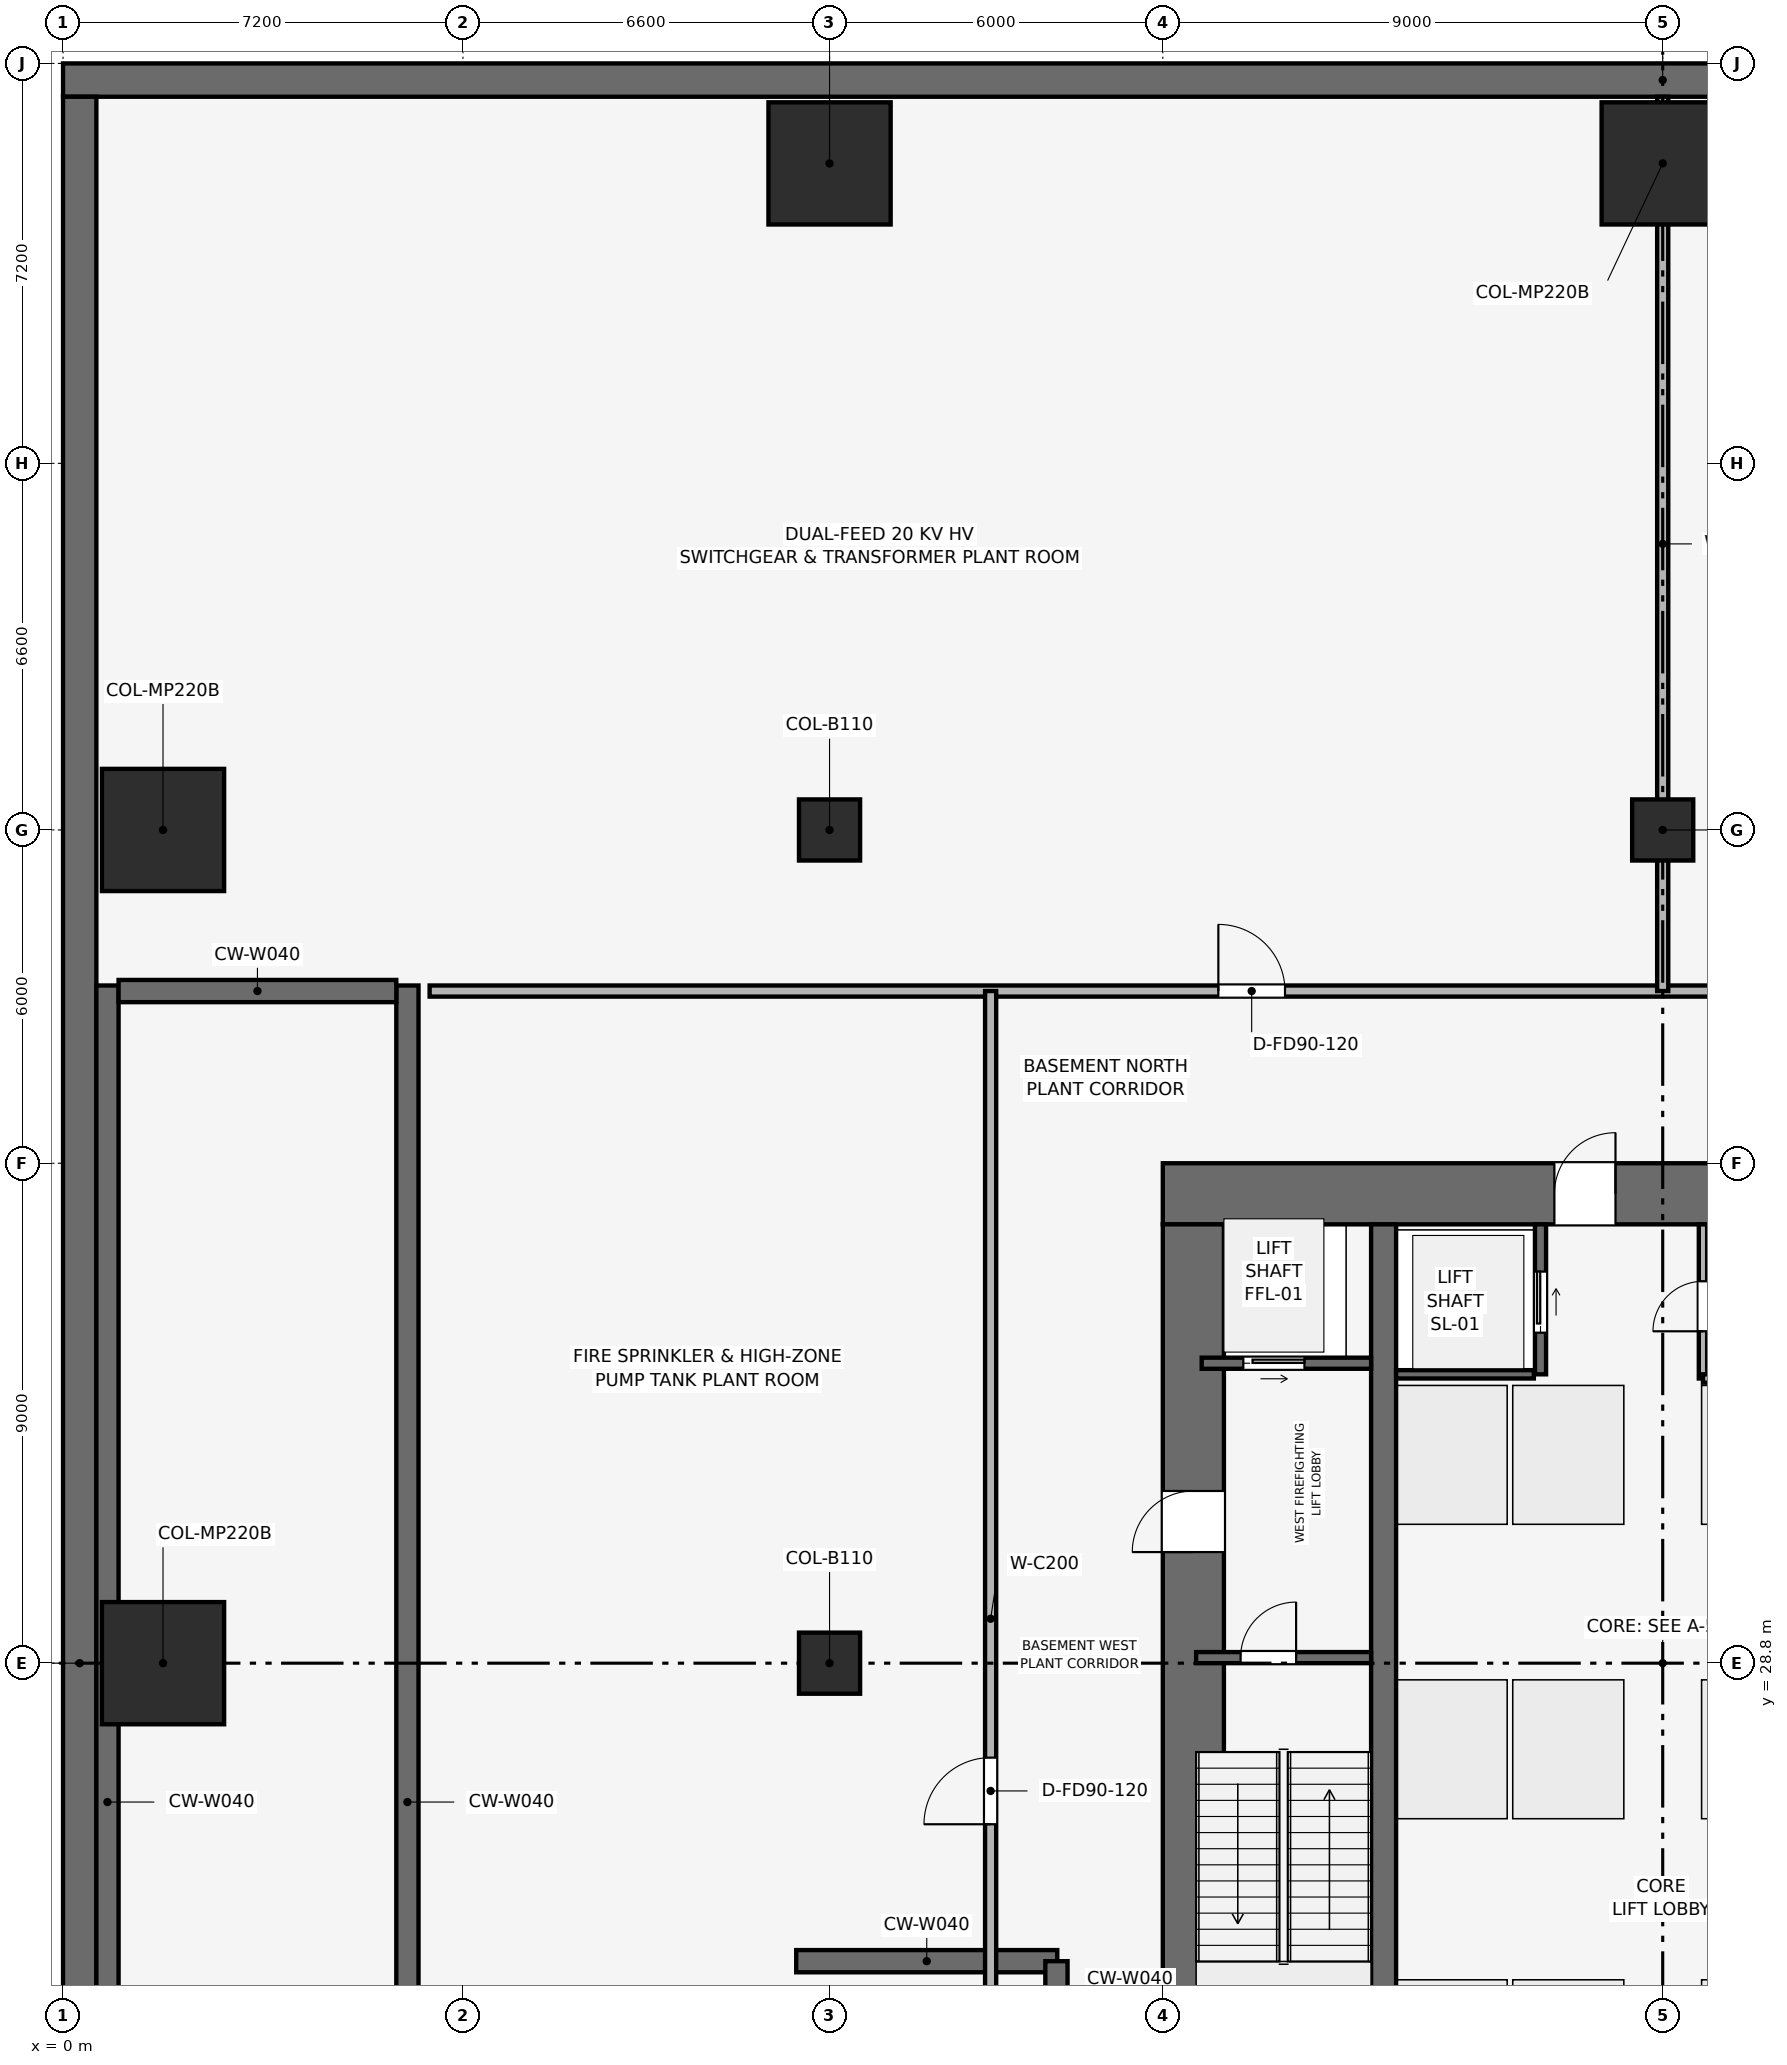
"""IFC4 building model, lengths in metres.
Left out: names, types, materials, properties, quantities, classifications, styles, units other than length and angle.
Written with IfcOpenShell. Run it as: python <this file> out.ifc"""

import sys

from ifc_helpers import new_model, si_unit, direction, frame, frame_2d, origin, origin_2d, place, context, subcontext, project, spatial, rectangle, extrude, element, fill, save


model = new_model("IFC4")
c1 = context("Model", 3, precision=1e-05, world=origin(), true_north=direction((0.0, 1.0)))
c2 = subcontext(c1, "Body", "Model", "MODEL_VIEW")
j1 = project(units=[si_unit("LENGTHUNIT", "METRE"), si_unit("PLANEANGLEUNIT", "RADIAN")], contexts=[c1])
p1 = place(None, origin())
s1 = spatial("IfcSite", under=j1, at=p1, CompositionType="ELEMENT")
p2 = place(p1, origin())
s2 = spatial("IfcBuilding", under=s1, at=p2, CompositionType="ELEMENT")
p3 = place(p2, frame((0.0, 0.0, -9.6)))
s3 = spatial("IfcBuildingStorey", under=s2, at=p3, CompositionType="ELEMENT", Elevation=-9.6)
p4 = place(p3, frame((0.0, 57.3, 0.0), z_axis=(0.0, 0.0, 1.0), x_axis=(1.0, 0.0, 0.0)))
e1 = element("IfcWall", 1, at=p4, inside=s3, PredefinedType="SOLIDWALL", context=c2, shape_type="SweptSolid", body=[
    extrude(rectangle(XDim=57.6, YDim=0.6, at=frame_2d((28.8, 0.0))), origin(), (0.0, 0.0, 1.0), 4.8),
])
p5 = place(p3, frame((0.3, 0.6, 0.0), z_axis=(0.0, 0.0, 1.0), x_axis=(0.0, 1.0, 0.0)))
e2 = element("IfcWall", 2, at=p5, inside=s3, PredefinedType="SOLIDWALL", context=c2, shape_type="SweptSolid", body=[
    extrude(rectangle(XDim=56.4, YDim=0.6, at=frame_2d((28.2, 0.0))), origin(), (0.0, 0.0, 1.0), 4.8),
])
p6 = place(p3, frame((19.8, 37.25, 0.0), z_axis=(0.0, 0.0, 1.0), x_axis=(1.0, 0.0, 0.0)))
e3 = element("IfcWall", 3, at=p6, inside=s3, PredefinedType="SHEAR", context=c2, shape_type="SweptSolid", body=[
    extrude(rectangle(XDim=18.0, YDim=1.1, at=frame_2d((9.0, 0.0))), origin(), (0.0, 0.0, 1.0), 4.8),
])
p7 = place(p6, frame((7.05, 0.0, 0.0)))
e4 = element("IfcOpeningElement", 4, at=p7, cuts=e3, PredefinedType="OPENING", context=c2, shape_type="SweptSolid", body=[
    extrude(rectangle(XDim=1.1, YDim=2.15, at=frame_2d((0.55, 1.075))), frame((0.0, 0.56, 0.0), z_axis=(0.0, -1.0, 0.0), x_axis=(1.0, 0.0, 0.0)), (0.0, 0.0, 1.0), 1.12),
])
p8 = place(p3, frame((20.35, 20.9, 0.0), z_axis=(0.0, 0.0, 1.0), x_axis=(0.0, 1.0, 0.0)))
e5 = element("IfcWall", 5, at=p8, inside=s3, PredefinedType="SHEAR", context=c2, shape_type="SweptSolid", body=[
    extrude(rectangle(XDim=15.8, YDim=1.1, at=frame_2d((7.9, 0.0))), origin(), (0.0, 0.0, 1.0), 4.8),
])
p9 = place(p8, frame((9.9, 0.0, 0.0)))
e6 = element("IfcOpeningElement", 6, at=p9, cuts=e5, PredefinedType="OPENING", context=c2, shape_type="SweptSolid", body=[
    extrude(rectangle(XDim=1.1, YDim=2.15, at=frame_2d((0.55, 1.075))), frame((0.0, 0.56, 0.0), z_axis=(0.0, -1.0, 0.0), x_axis=(1.0, 0.0, 0.0)), (0.0, 0.0, 1.0), 1.12),
])
p10 = place(p3, frame((23.775, 20.9, 0.0), z_axis=(0.0, 0.0, 1.0), x_axis=(0.0, 1.0, 0.0)))
e7 = element("IfcWall", 7, at=p10, inside=s3, PredefinedType="SHEAR", context=c2, shape_type="SweptSolid", body=[
    extrude(rectangle(XDim=15.8, YDim=0.45, at=frame_2d((7.9, 0.0))), origin(), (0.0, 0.0, 1.0), 4.8),
])
for number, where, z_axis, x_axis in (
    (8, (28.8, 55.8, 0.0), (0.0, 0.0, 1.0), (1.0, 0.0, 0.0)),
    (9, (13.8, 55.8, 0.0), (0.0, 0.0, 1.0), (1.0, 0.0, 0.0)),
    (10, (1.8, 43.8, 0.0), (0.0, 0.0, 1.0), (1.0, 0.0, 0.0)),
    (11, (1.8, 28.8, 0.0), (0.0, 0.0, 1.0), (1.0, 0.0, 0.0)),
):
    element("IfcColumn", number, at=place(p3, frame(where, z_axis=z_axis, x_axis=x_axis)), inside=s3, PredefinedType="COLUMN", context=c2, shape_type="SweptSolid", body=[
        extrude(rectangle(XDim=2.2, YDim=2.2, at=origin_2d()), origin(), (0.0, 0.0, 1.0), 4.798),
    ])
for number, where, z_axis, x_axis in (
    (12, (13.8, 43.8, 0.0), (0.0, 0.0, 1.0), (1.0, 0.0, 0.0)),
    (13, (28.8, 43.8, 0.0), (0.0, 0.0, 1.0), (1.0, 0.0, 0.0)),
    (14, (13.8, 28.8, 0.0), (0.0, 0.0, 1.0), (1.0, 0.0, 0.0)),
):
    element("IfcColumn", number, at=place(p3, frame(where, z_axis=z_axis, x_axis=x_axis)), inside=s3, PredefinedType="COLUMN", context=c2, shape_type="SweptSolid", body=[
        extrude(rectangle(XDim=1.1, YDim=1.1, at=origin_2d()), origin(), (0.0, 0.0, 1.0), 4.798),
    ])
for number, where, z_axis, x_axis in (
    (15, (0.8, 11.6, 0.0), (0.0, 0.0, 1.0), (0.0, 1.0, 0.0)),
    (16, (6.2, 11.6, 0.0), (0.0, 0.0, 1.0), (0.0, 1.0, 0.0)),
):
    element("IfcWall", number, at=place(p3, frame(where, z_axis=z_axis, x_axis=x_axis)), inside=s3, PredefinedType="SHEAR", context=c2, shape_type="SweptSolid", body=[
        extrude(rectangle(XDim=29.4, YDim=0.4, at=frame_2d((14.7, 0.0))), origin(), (0.0, 0.0, 1.0), 4.45),
    ])
p11 = place(p3, frame((1.0, 40.9, 0.0), z_axis=(0.0, 0.0, 1.0), x_axis=(1.0, 0.0, 0.0)))
e17 = element("IfcWall", 17, at=p11, inside=s3, PredefinedType="SHEAR", context=c2, shape_type="SweptSolid", body=[
    extrude(rectangle(XDim=5.0, YDim=0.4, at=frame_2d((2.5, 0.0))), origin(), (0.0, 0.0, 1.0), 4.45),
])
p12 = place(p3, frame((13.2, 23.435, 0.0), z_axis=(0.0, 0.0, 1.0), x_axis=(1.0, 0.0, 0.0)))
e18 = element("IfcWall", 18, at=p12, inside=s3, PredefinedType="SHEAR", context=c2, shape_type="SweptSolid", body=[
    extrude(rectangle(XDim=4.7, YDim=0.4, at=frame_2d((2.35, 0.0))), origin(), (0.0, 0.0, 1.0), 4.448),
])
p13 = place(p3, frame((17.885, 20.115, 0.0), z_axis=(0.0, 0.0, 1.0), x_axis=(0.0, 1.0, 0.0)))
e19 = element("IfcWall", 19, at=p13, inside=s3, PredefinedType="SHEAR", context=c2, shape_type="SweptSolid", body=[
    extrude(rectangle(XDim=3.32, YDim=0.4, at=frame_2d((1.66, 0.0))), origin(), (0.0, 0.0, 1.0), 4.448),
])
p14 = place(p3, frame((20.4, 28.9, 0.0), z_axis=(0.0, 0.0, 1.0), x_axis=(1.0, 0.0, 0.0)))
e20 = element("IfcWall", 20, at=p14, inside=s3, PredefinedType="SHEAR", context=c2, shape_type="SweptSolid", body=[
    extrude(rectangle(XDim=3.15, YDim=0.2, at=frame_2d((1.575, 0.0))), origin(), (0.0, 0.0, 1.0), 4.45),
])
p15 = place(p14, frame((0.8, 0.0, 0.0)))
e21 = element("IfcOpeningElement", 21, at=p15, cuts=e20, PredefinedType="OPENING", context=c2, shape_type="SweptSolid", body=[
    extrude(rectangle(XDim=1.0, YDim=2.1, at=frame_2d((0.5, 1.05))), frame((0.0, 0.11, 0.0), z_axis=(0.0, -1.0, 0.0), x_axis=(1.0, 0.0, 0.0)), (0.0, 0.0, 1.0), 0.22),
])
p16 = place(p3, frame((20.5, 34.2, 0.0), z_axis=(0.0, 0.0, 1.0), x_axis=(1.0, 0.0, 0.0)))
e22 = element("IfcWall", 22, at=p16, inside=s3, PredefinedType="SHEAR", context=c2, shape_type="SweptSolid", body=[
    extrude(rectangle(XDim=3.05, YDim=0.2, at=frame_2d((1.525, 0.0))), origin(), (0.0, 0.0, 1.0), 4.45),
])
p17 = place(p16, frame((0.75, 0.0, 0.0)))
e23 = element("IfcOpeningElement", 23, at=p17, cuts=e22, PredefinedType="OPENING", context=c2, shape_type="SweptSolid", body=[
    extrude(rectangle(XDim=1.1, YDim=2.15, at=frame_2d((0.55, 1.075))), frame((0.0, 0.11, 0.0), z_axis=(0.0, -1.0, 0.0), x_axis=(1.0, 0.0, 0.0)), (0.0, 0.0, 1.0), 0.22),
])
p18 = place(p3, frame((26.6, 34.0, 0.0), z_axis=(0.0, 0.0, 1.0), x_axis=(0.0, 1.0, 0.0)))
e24 = element("IfcWall", 24, at=p18, inside=s3, PredefinedType="SHEAR", context=c2, shape_type="SweptSolid", body=[
    extrude(rectangle(XDim=2.7, YDim=0.2, at=frame_2d((1.35, 0.0))), origin(), (0.0, 0.0, 1.0), 4.45),
])
p19 = place(p18, frame((0.75, 0.0, 0.0)))
e25 = element("IfcOpeningElement", 25, at=p19, cuts=e24, PredefinedType="OPENING", context=c2, shape_type="SweptSolid", body=[
    extrude(rectangle(XDim=1.1, YDim=2.15, at=frame_2d((0.55, 1.075))), frame((0.0, 0.11, 0.0), z_axis=(0.0, -1.0, 0.0), x_axis=(1.0, 0.0, 0.0)), (0.0, 0.0, 1.0), 0.22),
])
p20 = place(p3, frame((24.0, 34.0, 0.0), z_axis=(0.0, 0.0, 1.0), x_axis=(1.0, 0.0, 0.0)))
e26 = element("IfcWall", 26, at=p20, inside=s3, PredefinedType="SHEAR", context=c2, shape_type="SweptSolid", body=[
    extrude(rectangle(XDim=2.48, YDim=0.15, at=frame_2d((1.24, 0.0))), origin(), (0.0, 0.0, 1.0), 4.45),
])
p21 = place(p3, frame((29.525, 33.925, 0.0), z_axis=(0.0, 0.0, 1.0), x_axis=(0.0, 1.0, 0.0)))
e27 = element("IfcWall", 27, at=p21, inside=s3, PredefinedType="PARTITIONING", context=c2, shape_type="SweptSolid", body=[
    extrude(rectangle(XDim=2.775, YDim=0.15, at=frame_2d((1.387, 0.0))), origin(), (0.0, 0.0, 1.0), 4.45),
])
p22 = place(p21, frame((0.85, 0.0, 0.0)))
e28 = element("IfcOpeningElement", 28, at=p22, cuts=e27, PredefinedType="OPENING", context=c2, shape_type="SweptSolid", body=[
    extrude(rectangle(XDim=0.9, YDim=2.1, at=frame_2d((0.45, 1.05))), frame((0.0, 0.085, 0.0), z_axis=(0.0, -1.0, 0.0), x_axis=(1.0, 0.0, 0.0)), (0.0, 0.0, 1.0), 0.17),
])
p23 = place(p3, frame((29.525, 33.925, 0.0), z_axis=(0.0, 0.0, 1.0), x_axis=(1.0, 0.0, 0.0)))
e29 = element("IfcWall", 29, at=p23, inside=s3, PredefinedType="PARTITIONING", context=c2, shape_type="SweptSolid", body=[
    extrude(rectangle(XDim=2.625, YDim=0.15, at=frame_2d((1.312, 0.0))), origin(), (0.0, 0.0, 1.0), 4.45),
])
p24 = place(p3, frame((6.6, 40.9, 0.0), z_axis=(0.0, 0.0, 1.0), x_axis=(1.0, 0.0, 0.0)))
e30 = element("IfcWall", 30, at=p24, inside=s3, PredefinedType="PARTITIONING", context=c2, shape_type="SweptSolid", body=[
    extrude(rectangle(XDim=50.4, YDim=0.2, at=frame_2d((25.2, 0.0))), origin(), (0.0, 0.0, 1.0), 3.035),
])
p25 = place(p24, frame((14.2, 0.0, 0.0)))
e31 = element("IfcOpeningElement", 31, at=p25, cuts=e30, PredefinedType="OPENING", context=c2, shape_type="SweptSolid", body=[
    extrude(rectangle(XDim=1.2, YDim=2.2, at=frame_2d((0.6, 1.1))), frame((0.0, 0.11, 0.0), z_axis=(0.0, -1.0, 0.0), x_axis=(1.0, 0.0, 0.0)), (0.0, 0.0, 1.0), 0.22),
])
p26 = place(p24, frame((28.2, 0.0, 0.0)))
e32 = element("IfcOpeningElement", 32, at=p26, cuts=e30, PredefinedType="OPENING", context=c2, shape_type="SweptSolid", body=[
    extrude(rectangle(XDim=1.2, YDim=2.2, at=frame_2d((0.6, 1.1))), frame((0.0, 0.11, 0.0), z_axis=(0.0, -1.0, 0.0), x_axis=(1.0, 0.0, 0.0)), (0.0, 0.0, 1.0), 0.22),
])
p27 = place(p3, frame((16.7, 16.7, 0.0), z_axis=(0.0, 0.0, 1.0), x_axis=(0.0, 1.0, 0.0)))
e33 = element("IfcWall", 33, at=p27, inside=s3, PredefinedType="PARTITIONING", context=c2, shape_type="SweptSolid", body=[
    extrude(rectangle(XDim=24.2, YDim=0.2, at=frame_2d((12.1, 0.0))), origin(), (0.0, 0.0, 1.0), 3.035),
])
p28 = place(p27, frame((9.2, 0.0, 0.0)))
e34 = element("IfcOpeningElement", 34, at=p28, cuts=e33, PredefinedType="OPENING", context=c2, shape_type="SweptSolid", body=[
    extrude(rectangle(XDim=1.2, YDim=2.2, at=frame_2d((0.6, 1.1))), frame((0.0, 0.11, 0.0), z_axis=(0.0, -1.0, 0.0), x_axis=(1.0, 0.0, 0.0)), (0.0, 0.0, 1.0), 0.22),
])
p29 = place(p3, frame((28.8, 40.9, 0.0), z_axis=(0.0, 0.0, 1.0), x_axis=(0.0, 1.0, 0.0)))
e35 = element("IfcWall", 35, at=p29, inside=s3, PredefinedType="PARTITIONING", context=c2, shape_type="SweptSolid", body=[
    extrude(rectangle(XDim=16.1, YDim=0.2, at=frame_2d((8.05, 0.0))), origin(), (0.0, 0.0, 1.0), 3.035),
])
p30 = place(p15, origin())
e36 = element("IfcDoor", 36, at=p30, inside=s3, OperationType="SINGLE_SWING_RIGHT", PredefinedType="DOOR", context=c2, shape_type="SweptSolid", body=[
    extrude(rectangle(XDim=1.0, YDim=2.1, at=frame_2d((0.5, 1.05))), frame((0.0, 0.025, 0.0), z_axis=(0.0, -1.0, 0.0), x_axis=(1.0, 0.0, 0.0)), (0.0, 0.0, 1.0), 0.05),
])
fill(e21, e36)
p31 = place(p17, origin())
e37 = element("IfcDoor", 37, at=p31, inside=s3, OperationType="SLIDING_TO_RIGHT", PredefinedType="DOOR", context=c2, shape_type="SweptSolid", body=[
    extrude(rectangle(XDim=1.1, YDim=2.15, at=frame_2d((0.55, 1.075))), frame((0.0, 0.025, 0.0), z_axis=(0.0, -1.0, 0.0), x_axis=(1.0, 0.0, 0.0)), (0.0, 0.0, 1.0), 0.05),
])
fill(e23, e37)
p32 = place(p19, origin())
e38 = element("IfcDoor", 38, at=p32, inside=s3, OperationType="SLIDING_TO_RIGHT", PredefinedType="DOOR", context=c2, shape_type="SweptSolid", body=[
    extrude(rectangle(XDim=1.1, YDim=2.15, at=frame_2d((0.55, 1.075))), frame((0.0, 0.025, 0.0), z_axis=(0.0, -1.0, 0.0), x_axis=(1.0, 0.0, 0.0)), (0.0, 0.0, 1.0), 0.05),
])
fill(e25, e38)
p33 = place(p22, origin())
e39 = element("IfcDoor", 39, at=p33, inside=s3, OperationType="SINGLE_SWING_LEFT", PredefinedType="DOOR", context=c2, shape_type="SweptSolid", body=[
    extrude(rectangle(XDim=0.9, YDim=2.1, at=frame_2d((0.45, 1.05))), frame((0.0, 0.025, 0.0), z_axis=(0.0, -1.0, 0.0), x_axis=(1.0, 0.0, 0.0)), (0.0, 0.0, 1.0), 0.05),
])
fill(e28, e39)
p34 = place(p25, origin())
e40 = element("IfcDoor", 40, at=p34, inside=s3, OperationType="SINGLE_SWING_LEFT", PredefinedType="DOOR", context=c2, shape_type="SweptSolid", body=[
    extrude(rectangle(XDim=1.2, YDim=2.2, at=frame_2d((0.6, 1.1))), frame((0.0, 0.025, 0.0), z_axis=(0.0, -1.0, 0.0), x_axis=(1.0, 0.0, 0.0)), (0.0, 0.0, 1.0), 0.05),
])
fill(e31, e40)
p35 = place(p28, origin())
e41 = element("IfcDoor", 41, at=p35, inside=s3, OperationType="SINGLE_SWING_LEFT", PredefinedType="DOOR", context=c2, shape_type="SweptSolid", body=[
    extrude(rectangle(XDim=1.2, YDim=2.2, at=frame_2d((0.6, 1.1))), frame((0.0, 0.025, 0.0), z_axis=(0.0, -1.0, 0.0), x_axis=(1.0, 0.0, 0.0)), (0.0, 0.0, 1.0), 0.05),
])
fill(e34, e41)
p36 = place(p9, origin())
e42 = element("IfcDoor", 42, at=p36, inside=s3, OperationType="SINGLE_SWING_LEFT", PredefinedType="DOOR", context=c2, shape_type="SweptSolid", body=[
    extrude(rectangle(XDim=1.1, YDim=2.15, at=frame_2d((0.55, 1.075))), frame((0.0, 0.025, 0.0), z_axis=(0.0, -1.0, 0.0), x_axis=(1.0, 0.0, 0.0)), (0.0, 0.0, 1.0), 0.05),
])
fill(e6, e42)
p37 = place(p7, origin())
e43 = element("IfcDoor", 43, at=p37, inside=s3, OperationType="SINGLE_SWING_RIGHT", PredefinedType="DOOR", context=c2, shape_type="SweptSolid", body=[
    extrude(rectangle(XDim=1.1, YDim=2.15, at=frame_2d((0.55, 1.075))), frame((0.0, 0.025, 0.0), z_axis=(0.0, -1.0, 0.0), x_axis=(1.0, 0.0, 0.0)), (0.0, 0.0, 1.0), 0.05),
])
fill(e4, e43)
save(model, sys.argv[1])
